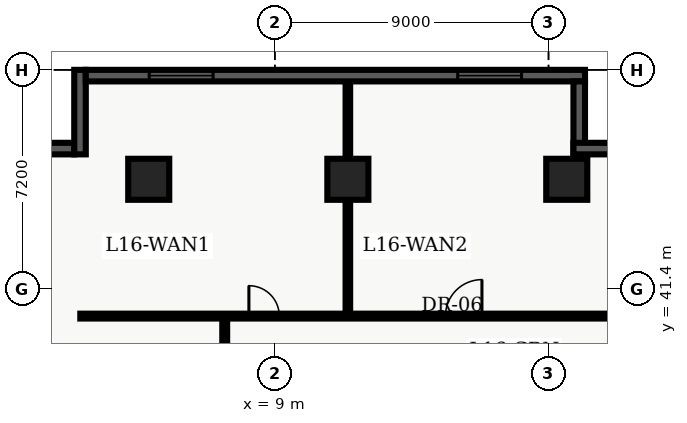
"""IFC4 building model, lengths in metres.
Left out: names, types, materials, properties, quantities, classifications, styles, units other than length and angle.
Written with IfcOpenShell. Run it as: python <this file> out.ifc"""

import sys

from ifc_helpers import new_model, entity, si_unit, converted_unit, direction, frame, origin_with_axes, origin_2d_with_axis, place, context, subcontext, project, spatial, polyline, rectangle, outline, extrude, element, fill, save


model = new_model("IFC4")
c1 = context("Model", 3, precision=1e-05, world=origin_with_axes(), true_north=direction((0.0, 1.0)))
c2 = subcontext(c1, "Body", "Model", "MODEL_VIEW")
j1 = project(units=[si_unit("LENGTHUNIT", "METRE"), converted_unit("PLANEANGLEUNIT", "DEGREE", entity("IfcPlaneAngleMeasure", 0.017), si_unit("PLANEANGLEUNIT", "RADIAN"), dimensions=[0, 0, 0, 0, 0, 0, 0])], contexts=[c1])
p1 = place(None, origin_with_axes())
s1 = spatial("IfcSite", under=j1, at=p1, CompositionType="ELEMENT")
p2 = place(p1, origin_with_axes())
s2 = spatial("IfcBuilding", under=s1, at=p2, CompositionType="ELEMENT")
p3 = place(p2, frame((0.0, 0.0, 67.8), z_axis=(0.0, 0.0, 1.0), x_axis=(1.0, 0.0, 0.0)))
s3 = spatial("IfcBuildingStorey", under=s2, at=p3, CompositionType="ELEMENT", Elevation=67.8)
for number, where, z_axis, x_axis in (
    (1, (11.4, 45.0, 0.0), (0.0, 0.0, 1.0), (1.0, 0.0, 0.0)),
    (2, (18.6, 45.0, 0.0), (0.0, 0.0, 1.0), (1.0, 0.0, 0.0)),
    (3, (4.85, 45.0, 0.0), (0.0, 0.0, 1.0), (1.0, 0.0, 0.0)),
):
    element("IfcColumn", number, at=place(p3, frame(where, z_axis=z_axis, x_axis=x_axis)), inside=s3, PredefinedType="COLUMN", context=c2, shape_type="SweptSolid", body=[
        extrude(rectangle(XDim=1.35, YDim=1.35, at=origin_2d_with_axis()), origin_with_axes(), (0.0, 0.0, 1.0), 3.9),
    ])
p4 = place(p3, frame((2.6, 40.5, 0.0), z_axis=(0.0, 0.0, 1.0), x_axis=(1.0, 0.0, 0.0)))
e4 = element("IfcWall", 4, at=p4, inside=s3, PredefinedType="PARTITIONING", context=c2, shape_type="SweptSolid", body=[
    extrude(outline(polyline([(0.0, -0.08), (18.65, -0.08), (18.65, 0.08), (0.0, 0.08), (0.0, -0.08)])), origin_with_axes(), (0.0, 0.0, 1.0), 2.7),
])
p5 = place(p4, frame((6.045, 0.0, 0.0), z_axis=(0.0, 0.0, 1.0), x_axis=(1.0, 0.0, 0.0)))
e5 = element("IfcOpeningElement", 5, at=p5, cuts=e4, PredefinedType="OPENING", context=c2, shape_type="SweptSolid", body=[
    extrude(rectangle(XDim=1.0, YDim=0.18, at=origin_2d_with_axis()), origin_with_axes(), (0.0, 0.0, 1.0), 2.15),
])
p6 = place(p4, frame((12.61, 0.0, 0.0), z_axis=(0.0, 0.0, 1.0), x_axis=(1.0, 0.0, 0.0)))
e6 = element("IfcOpeningElement", 6, at=p6, cuts=e4, PredefinedType="OPENING", context=c2, shape_type="SweptSolid", body=[
    extrude(rectangle(XDim=1.2, YDim=0.18, at=origin_2d_with_axis()), origin_with_axes(), (0.0, 0.0, 1.0), 2.2),
])
p7 = place(p3, frame((7.35, 7.8, 0.0), z_axis=(0.0, 0.0, 1.0), x_axis=(0.0, 1.0, 0.0)))
e7 = element("IfcWall", 7, at=p7, inside=s3, PredefinedType="PARTITIONING", context=c2, shape_type="SweptSolid", body=[
    extrude(outline(polyline([(0.0, -0.08), (32.7, -0.08), (32.7, 0.08), (0.0, 0.08), (0.0, -0.08)])), origin_with_axes(), (0.0, 0.0, 1.0), 2.7),
])
p8 = place(p7, frame((4.261, 0.0, 0.0), z_axis=(0.0, 0.0, 1.0), x_axis=(1.0, 0.0, 0.0)))
e8 = element("IfcOpeningElement", 8, at=p8, cuts=e7, PredefinedType="OPENING", context=c2, shape_type="SweptSolid", body=[
    extrude(rectangle(XDim=1.0, YDim=0.18, at=origin_2d_with_axis()), origin_with_axes(), (0.0, 0.0, 1.0), 2.15),
])
p9 = place(p7, frame((13.729, 0.0, 0.0), z_axis=(0.0, 0.0, 1.0), x_axis=(1.0, 0.0, 0.0)))
e9 = element("IfcOpeningElement", 9, at=p9, cuts=e7, PredefinedType="OPENING", context=c2, shape_type="SweptSolid", body=[
    extrude(rectangle(XDim=1.0, YDim=0.18, at=origin_2d_with_axis()), origin_with_axes(), (0.0, 0.0, 1.0), 2.15),
])
p10 = place(p7, frame((25.819, 0.0, 0.0), z_axis=(0.0, 0.0, 1.0), x_axis=(1.0, 0.0, 0.0)))
e10 = element("IfcOpeningElement", 10, at=p10, cuts=e7, PredefinedType="OPENING", context=c2, shape_type="SweptSolid", body=[
    extrude(rectangle(XDim=1.0, YDim=0.18, at=origin_2d_with_axis()), origin_with_axes(), (0.0, 0.0, 1.0), 2.15),
])
p11 = place(p3, frame((11.4, 40.6, 0.0), z_axis=(0.0, 0.0, 1.0), x_axis=(0.0, 1.0, 0.0)))
e11 = element("IfcWall", 11, at=p11, inside=s3, PredefinedType="PARTITIONING", context=c2, shape_type="SweptSolid", body=[
    extrude(outline(polyline([(0.0, -0.075), (7.64, -0.075), (7.64, 0.075), (0.0, 0.075), (0.0, -0.075)])), origin_with_axes(), (0.0, 0.0, 1.0), 2.7),
])
p12 = place(p3, frame((0.38, 46.01, 0.0), z_axis=(0.0, 0.0, 1.0), x_axis=(1.0, 0.0, 0.0)))
e12 = element("IfcWall", 12, at=p12, inside=s3, PredefinedType="SOLIDWALL", context=c2, shape_type="SweptSolid", body=[
    extrude(outline(polyline([(0.0, -0.19), (2.02, -0.19), (2.02, 0.19), (0.0, 0.19), (0.0, -0.19)])), origin_with_axes(), (0.0, 0.0, 1.0), 3.66),
])
p13 = place(p3, frame((2.59, 45.82, 0.0), z_axis=(0.0, 0.0, 1.0), x_axis=(0.0, 1.0, 0.0)))
e13 = element("IfcWall", 13, at=p13, inside=s3, PredefinedType="SOLIDWALL", context=c2, shape_type="SweptSolid", body=[
    extrude(outline(polyline([(0.0, -0.19), (2.78, -0.19), (2.78, 0.19), (0.0, 0.19), (0.0, -0.19)])), origin_with_axes(), (0.0, 0.0, 1.0), 3.66),
])
p14 = place(p3, frame((2.78, 48.41, 0.0), z_axis=(0.0, 0.0, 1.0), x_axis=(1.0, 0.0, 0.0)))
e14 = element("IfcWall", 14, at=p14, inside=s3, PredefinedType="SOLIDWALL", context=c2, shape_type="SweptSolid", body=[
    extrude(outline(polyline([(0.0, -0.19), (16.42, -0.19), (16.42, 0.19), (0.0, 0.19), (0.0, -0.19)])), origin_with_axes(), (0.0, 0.0, 1.0), 3.66),
])
p15 = place(p14, frame((3.137, 0.0, 0.45), z_axis=(0.0, 0.0, 1.0), x_axis=(1.0, 0.0, 0.0)))
e15 = element("IfcOpeningElement", 15, at=p15, cuts=e14, PredefinedType="OPENING", context=c2, shape_type="SweptSolid", body=[
    extrude(rectangle(XDim=2.1, YDim=0.4, at=origin_2d_with_axis()), origin_with_axes(), (0.0, 0.0, 1.0), 2.2),
])
p16 = place(p14, frame((13.283, 0.0, 0.45), z_axis=(0.0, 0.0, 1.0), x_axis=(1.0, 0.0, 0.0)))
e16 = element("IfcOpeningElement", 16, at=p16, cuts=e14, PredefinedType="OPENING", context=c2, shape_type="SweptSolid", body=[
    extrude(rectangle(XDim=2.1, YDim=0.4, at=origin_2d_with_axis()), origin_with_axes(), (0.0, 0.0, 1.0), 2.2),
])
p17 = place(p3, frame((19.01, 48.22, 0.0), z_axis=(0.0, 0.0, 1.0), x_axis=(0.0, -1.0, 0.0)))
e17 = element("IfcWall", 17, at=p17, inside=s3, PredefinedType="SOLIDWALL", context=c2, shape_type="SweptSolid", body=[
    extrude(outline(polyline([(0.0, -0.19), (2.56, -0.19), (2.56, 0.19), (0.0, 0.19), (0.0, -0.19)])), origin_with_axes(), (0.0, 0.0, 1.0), 3.66),
])
p18 = place(p3, frame((18.82, 46.01, 0.0), z_axis=(0.0, 0.0, 1.0), x_axis=(1.0, 0.0, 0.0)))
e18 = element("IfcWall", 18, at=p18, inside=s3, PredefinedType="SOLIDWALL", context=c2, shape_type="SweptSolid", body=[
    extrude(outline(polyline([(0.0, -0.19), (2.78, -0.19), (2.78, 0.19), (0.0, 0.19), (0.0, -0.19)])), origin_with_axes(), (0.0, 0.0, 1.0), 3.66),
])
p19 = place(p4, frame((6.045, 0.0, 0.0), z_axis=(0.0, 0.0, 1.0), x_axis=(1.0, 0.0, 0.0)))
e19 = element("IfcDoor", 19, at=p19, inside=s3, OperationType="SINGLE_SWING_LEFT", PredefinedType="DOOR", context=c2, shape_type="SweptSolid", body=[
    extrude(rectangle(XDim=1.0, YDim=0.09, at=origin_2d_with_axis()), origin_with_axes(), (0.0, 0.0, 1.0), 2.15),
])
fill(e5, e19)
p20 = place(p4, frame((12.61, 0.0, 0.0), z_axis=(0.0, 0.0, 1.0), x_axis=(1.0, 0.0, 0.0)))
e20 = element("IfcDoor", 20, at=p20, inside=s3, OperationType="SINGLE_SWING_RIGHT", PredefinedType="DOOR", context=c2, shape_type="SweptSolid", body=[
    extrude(rectangle(XDim=1.2, YDim=0.09, at=origin_2d_with_axis()), origin_with_axes(), (0.0, 0.0, 1.0), 2.2),
])
fill(e6, e20)
p21 = place(p14, frame((3.137, 0.0, 0.45), z_axis=(0.0, 0.0, 1.0), x_axis=(1.0, 0.0, 0.0)))
e21 = element("IfcWindow", 21, at=p21, inside=s3, PredefinedType="WINDOW", context=c2, shape_type="SweptSolid", body=[
    extrude(rectangle(XDim=2.1, YDim=0.09, at=origin_2d_with_axis()), origin_with_axes(), (0.0, 0.0, 1.0), 2.2),
])
fill(e15, e21)
p22 = place(p14, frame((13.283, 0.0, 0.45), z_axis=(0.0, 0.0, 1.0), x_axis=(1.0, 0.0, 0.0)))
e22 = element("IfcWindow", 22, at=p22, inside=s3, PredefinedType="WINDOW", context=c2, shape_type="SweptSolid", body=[
    extrude(rectangle(XDim=2.1, YDim=0.09, at=origin_2d_with_axis()), origin_with_axes(), (0.0, 0.0, 1.0), 2.2),
])
fill(e16, e22)
save(model, sys.argv[1])
